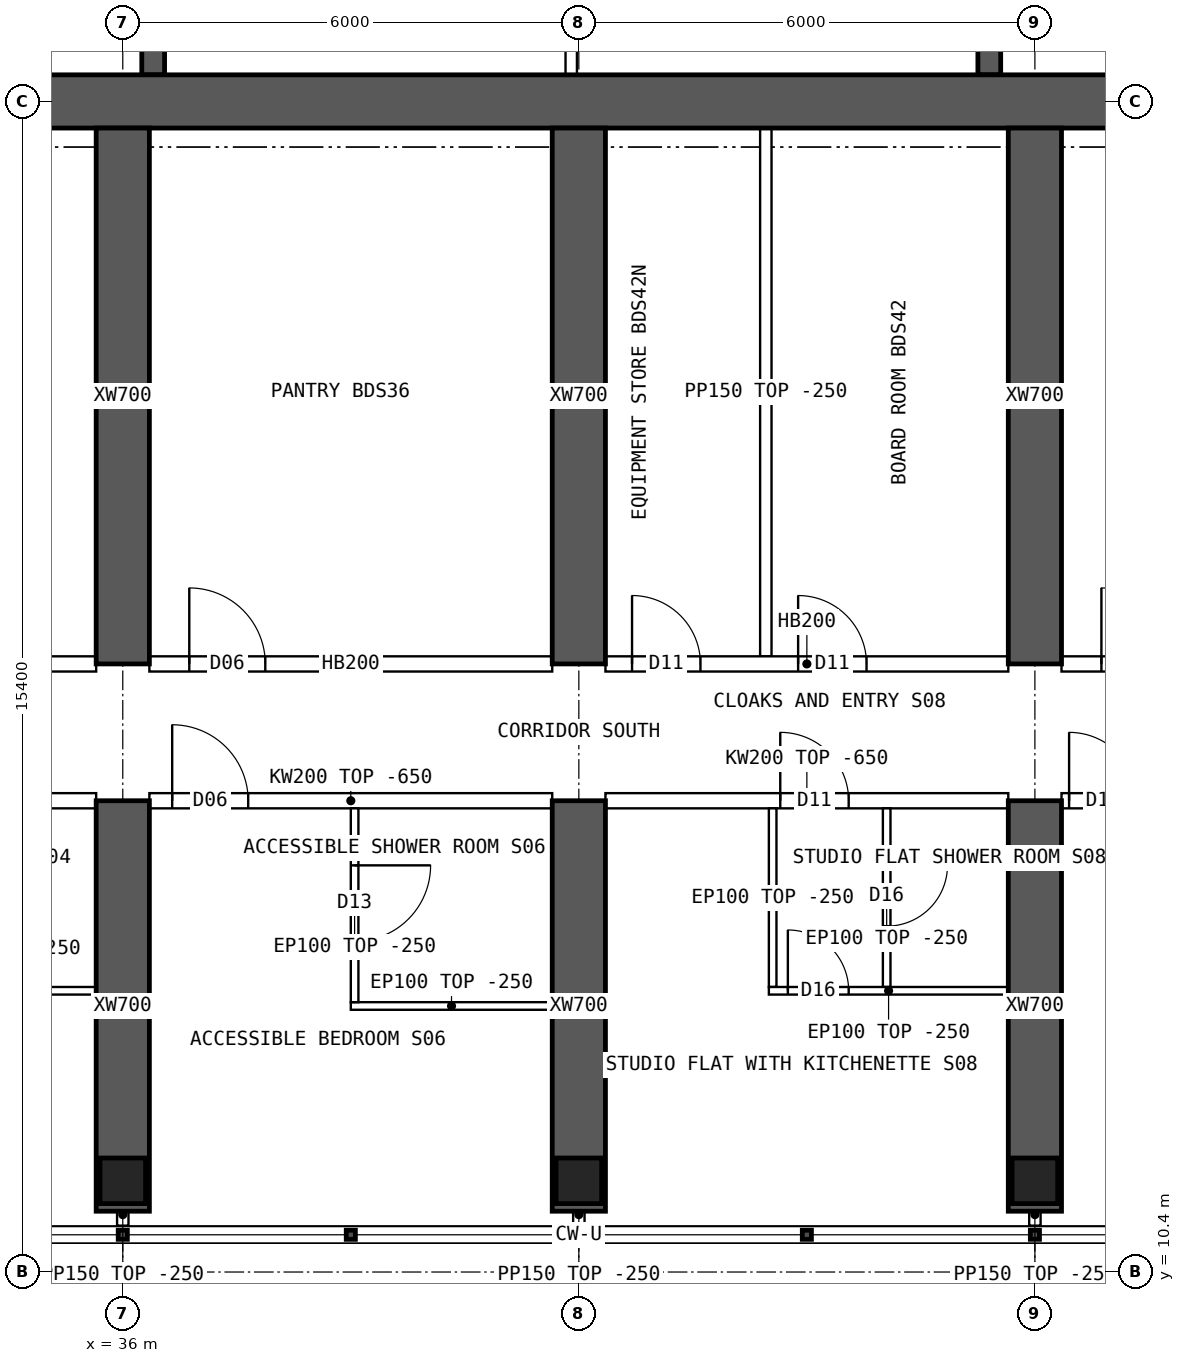
"""IFC4 building model, lengths in metres.
Left out: names, types, materials, properties, quantities, classifications, styles, units other than length and angle.
Written with IfcOpenShell. Run it as: python <this file> out.ifc"""

import sys

from ifc_helpers import new_model, si_unit, direction, frame, frame_2d, origin, origin_2d, place, context, subcontext, project, spatial, polyline, rectangle, hollow_rectangle, outline, extrude, element, fill, save


model = new_model("IFC4")
c1 = context("Model", 3, precision=1e-05, world=origin(), true_north=direction((0.0, 1.0)))
c2 = subcontext(c1, "Body", "Model", "MODEL_VIEW")
j1 = project(units=[si_unit("LENGTHUNIT", "METRE"), si_unit("PLANEANGLEUNIT", "RADIAN")], contexts=[c1])
p1 = place(None, origin())
s1 = spatial("IfcSite", under=j1, at=p1, CompositionType="ELEMENT")
p2 = place(p1, origin())
s2 = spatial("IfcBuilding", under=s1, at=p2, CompositionType="ELEMENT")
p3 = place(p2, frame((0.0, 0.0, 216.55)))
s3 = spatial("IfcBuildingStorey", under=s2, at=p3, CompositionType="ELEMENT", Elevation=216.55)
for number, where, z_axis, x_axis in (
    (1, (36.0, 11.6, 0.0), (0.0, 0.0, 1.0), (1.0, 0.0, 0.0)),
    (2, (42.0, 11.6, 0.0), (0.0, 0.0, 1.0), (1.0, 0.0, 0.0)),
    (3, (48.0, 11.6, 0.0), (0.0, 0.0, 1.0), (1.0, 0.0, 0.0)),
):
    element("IfcColumn", number, at=place(p3, frame(where, z_axis=z_axis, x_axis=x_axis)), inside=s3, PredefinedType="COLUMN", context=c2, shape_type="SweptSolid", body=[
        extrude(hollow_rectangle(XDim=0.6, YDim=0.6, WallThickness=0.06, at=origin_2d()), origin(), (0.0, 0.0, 1.0), 3.75),
    ])
p4 = place(p3, frame((18.0, 25.8, 0.0), z_axis=(0.0, 0.0, 1.0), x_axis=(1.0, 0.0, 0.0)))
e4 = element("IfcWall", 4, at=p4, inside=s3, PredefinedType="SHEAR", context=c2, shape_type="SweptSolid", body=[
    extrude(rectangle(XDim=48.0, YDim=0.7, at=frame_2d((24.0, 0.0))), origin(), (0.0, 0.0, 1.0), 3.75),
])
for number, where, z_axis, x_axis in (
    (5, (36.4, 26.15, 0.0), (0.0, 0.0, 1.0), (0.0, 1.0, 0.0)),
    (6, (47.4, 26.15, 0.0), (0.0, 0.0, 1.0), (0.0, 1.0, 0.0)),
):
    element("IfcWall", number, at=place(p3, frame(where, z_axis=z_axis, x_axis=x_axis)), inside=s3, PredefinedType="SHEAR", context=c2, shape_type="SweptSolid", body=[
        extrude(rectangle(XDim=4.1, YDim=0.3, at=frame_2d((2.05, 0.0))), origin(), (0.0, 0.0, 1.0), 3.75),
    ])
p5 = place(p3, frame((36.0, 11.2, 0.0), z_axis=(0.0, 0.0, 1.0), x_axis=(0.0, 1.0, 0.0)))
e7 = element("IfcWall", 7, at=p5, inside=s3, PredefinedType="SHEAR", context=c2, shape_type="SweptSolid", body=[
    extrude(rectangle(XDim=5.4, YDim=0.7, at=frame_2d((2.7, 0.0))), origin(), (0.0, 0.0, 1.0), 3.75),
])
p6 = place(p3, frame((36.0, 18.4, 0.0), z_axis=(0.0, 0.0, 1.0), x_axis=(0.0, 1.0, 0.0)))
e8 = element("IfcWall", 8, at=p6, inside=s3, PredefinedType="SHEAR", context=c2, shape_type="SweptSolid", body=[
    extrude(rectangle(XDim=7.05, YDim=0.7, at=frame_2d((3.525, 0.0))), origin(), (0.0, 0.0, 1.0), 3.75),
])
p7 = place(p3, frame((42.0, 11.2, 0.0), z_axis=(0.0, 0.0, 1.0), x_axis=(0.0, 1.0, 0.0)))
e9 = element("IfcWall", 9, at=p7, inside=s3, PredefinedType="SHEAR", context=c2, shape_type="SweptSolid", body=[
    extrude(rectangle(XDim=5.4, YDim=0.7, at=frame_2d((2.7, 0.0))), origin(), (0.0, 0.0, 1.0), 3.75),
])
p8 = place(p3, frame((42.0, 18.4, 0.0), z_axis=(0.0, 0.0, 1.0), x_axis=(0.0, 1.0, 0.0)))
e10 = element("IfcWall", 10, at=p8, inside=s3, PredefinedType="SHEAR", context=c2, shape_type="SweptSolid", body=[
    extrude(rectangle(XDim=7.05, YDim=0.7, at=frame_2d((3.525, 0.0))), origin(), (0.0, 0.0, 1.0), 3.75),
])
p9 = place(p3, frame((48.0, 11.2, 0.0), z_axis=(0.0, 0.0, 1.0), x_axis=(0.0, 1.0, 0.0)))
e11 = element("IfcWall", 11, at=p9, inside=s3, PredefinedType="SHEAR", context=c2, shape_type="SweptSolid", body=[
    extrude(rectangle(XDim=5.4, YDim=0.7, at=frame_2d((2.7, 0.0))), origin(), (0.0, 0.0, 1.0), 3.75),
])
p10 = place(p3, frame((48.0, 18.4, 0.0), z_axis=(0.0, 0.0, 1.0), x_axis=(0.0, 1.0, 0.0)))
e12 = element("IfcWall", 12, at=p10, inside=s3, PredefinedType="SHEAR", context=c2, shape_type="SweptSolid", body=[
    extrude(rectangle(XDim=7.05, YDim=0.7, at=frame_2d((3.525, 0.0))), origin(), (0.0, 0.0, 1.0), 3.75),
])
p11 = place(p3, frame((41.9, 26.15, 0.0), z_axis=(0.0, 0.0, 1.0), x_axis=(0.0, 1.0, 0.0)))
e13 = element("IfcWall", 13, at=p11, inside=s3, PredefinedType="SOLIDWALL", context=c2, shape_type="SweptSolid", body=[
    extrude(rectangle(XDim=4.1, YDim=0.15, at=frame_2d((2.05, 0.0))), origin(), (0.0, 0.0, 1.0), 3.5),
])
p12 = place(p3, frame((30.35, 16.6, 0.0), z_axis=(0.0, 0.0, 1.0), x_axis=(1.0, 0.0, 0.0)))
e14 = element("IfcWall", 14, at=p12, inside=s3, PredefinedType="SOLIDWALL", context=c2, shape_type="SweptSolid", body=[
    extrude(outline(polyline([(0.0, 0.0), (5.3, 0.0), (5.3, 3.1), (0.0, 3.1), (0.0, 0.0)])), frame((0.0, 0.1, 0.0), z_axis=(0.0, -1.0, 0.0), x_axis=(1.0, 0.0, 0.0)), (0.0, 0.0, 1.0), 0.2),
])
p13 = place(p12, frame((0.1, 0.0, 0.0)))
e15 = element("IfcOpeningElement", 15, at=p13, cuts=e14, PredefinedType="OPENING", context=c2, shape_type="SweptSolid", body=[
    extrude(rectangle(XDim=0.9, YDim=2.1, at=frame_2d((0.45, 1.05))), frame((0.0, 0.11, 0.0), z_axis=(0.0, -1.0, 0.0), x_axis=(1.0, 0.0, 0.0)), (0.0, 0.0, 1.0), 0.22),
])
p14 = place(p3, frame((30.35, 18.4, 0.0), z_axis=(0.0, 0.0, 1.0), x_axis=(1.0, 0.0, 0.0)))
e16 = element("IfcWall", 16, at=p14, inside=s3, PredefinedType="SOLIDWALL", context=c2, shape_type="SweptSolid", body=[
    extrude(rectangle(XDim=5.3, YDim=0.2, at=frame_2d((2.65, 0.0))), origin(), (0.0, 0.0, 1.0), 3.5),
])
p15 = place(p14, frame((0.8, 0.0, 0.0)))
e17 = element("IfcOpeningElement", 17, at=p15, cuts=e16, PredefinedType="OPENING", context=c2, shape_type="SweptSolid", body=[
    extrude(rectangle(XDim=1.0, YDim=2.1, at=frame_2d((0.5, 1.05))), frame((0.0, 0.11, 0.0), z_axis=(0.0, -1.0, 0.0), x_axis=(1.0, 0.0, 0.0)), (0.0, 0.0, 1.0), 0.22),
])
p16 = place(p3, frame((36.35, 16.6, 0.0), z_axis=(0.0, 0.0, 1.0), x_axis=(1.0, 0.0, 0.0)))
e18 = element("IfcWall", 18, at=p16, inside=s3, PredefinedType="SOLIDWALL", context=c2, shape_type="SweptSolid", body=[
    extrude(outline(polyline([(0.0, 0.0), (5.3, 0.0), (5.3, 3.1), (0.0, 3.1), (0.0, 0.0)])), frame((0.0, 0.1, 0.0), z_axis=(0.0, -1.0, 0.0), x_axis=(1.0, 0.0, 0.0)), (0.0, 0.0, 1.0), 0.2),
])
p17 = place(p16, frame((0.3, 0.0, 0.0)))
e19 = element("IfcOpeningElement", 19, at=p17, cuts=e18, PredefinedType="OPENING", context=c2, shape_type="SweptSolid", body=[
    extrude(rectangle(XDim=1.0, YDim=2.1, at=frame_2d((0.5, 1.05))), frame((0.0, 0.11, 0.0), z_axis=(0.0, -1.0, 0.0), x_axis=(1.0, 0.0, 0.0)), (0.0, 0.0, 1.0), 0.22),
])
p18 = place(p3, frame((36.35, 18.4, 0.0), z_axis=(0.0, 0.0, 1.0), x_axis=(1.0, 0.0, 0.0)))
e20 = element("IfcWall", 20, at=p18, inside=s3, PredefinedType="SOLIDWALL", context=c2, shape_type="SweptSolid", body=[
    extrude(rectangle(XDim=5.3, YDim=0.2, at=frame_2d((2.65, 0.0))), origin(), (0.0, 0.0, 1.0), 3.5),
])
p19 = place(p18, frame((0.525, 0.0, 0.0)))
e21 = element("IfcOpeningElement", 21, at=p19, cuts=e20, PredefinedType="OPENING", context=c2, shape_type="SweptSolid", body=[
    extrude(rectangle(XDim=1.0, YDim=2.1, at=frame_2d((0.5, 1.05))), frame((0.0, 0.11, 0.0), z_axis=(0.0, -1.0, 0.0), x_axis=(1.0, 0.0, 0.0)), (0.0, 0.0, 1.0), 0.22),
])
p20 = place(p3, frame((42.35, 16.6, 0.0), z_axis=(0.0, 0.0, 1.0), x_axis=(1.0, 0.0, 0.0)))
e22 = element("IfcWall", 22, at=p20, inside=s3, PredefinedType="SOLIDWALL", context=c2, shape_type="SweptSolid", body=[
    extrude(outline(polyline([(0.0, 0.0), (5.3, 0.0), (5.3, 3.1), (0.0, 3.1), (0.0, 0.0)])), frame((0.0, 0.1, 0.0), z_axis=(0.0, -1.0, 0.0), x_axis=(1.0, 0.0, 0.0)), (0.0, 0.0, 1.0), 0.2),
])
p21 = place(p20, frame((2.3, 0.0, 0.0)))
e23 = element("IfcOpeningElement", 23, at=p21, cuts=e22, PredefinedType="OPENING", context=c2, shape_type="SweptSolid", body=[
    extrude(rectangle(XDim=0.9, YDim=2.1, at=frame_2d((0.45, 1.05))), frame((0.0, 0.11, 0.0), z_axis=(0.0, -1.0, 0.0), x_axis=(1.0, 0.0, 0.0)), (0.0, 0.0, 1.0), 0.22),
])
p22 = place(p3, frame((42.35, 18.4, 0.0), z_axis=(0.0, 0.0, 1.0), x_axis=(1.0, 0.0, 0.0)))
e24 = element("IfcWall", 24, at=p22, inside=s3, PredefinedType="SOLIDWALL", context=c2, shape_type="SweptSolid", body=[
    extrude(rectangle(XDim=5.3, YDim=0.2, at=frame_2d((2.65, 0.0))), origin(), (0.0, 0.0, 1.0), 3.5),
])
p23 = place(p22, frame((0.35, 0.0, 0.0)))
e25 = element("IfcOpeningElement", 25, at=p23, cuts=e24, PredefinedType="OPENING", context=c2, shape_type="SweptSolid", body=[
    extrude(rectangle(XDim=0.9, YDim=2.1, at=frame_2d((0.45, 1.05))), frame((0.0, 0.11, 0.0), z_axis=(0.0, -1.0, 0.0), x_axis=(1.0, 0.0, 0.0)), (0.0, 0.0, 1.0), 0.22),
])
p24 = place(p22, frame((2.535, 0.0, 0.0)))
e26 = element("IfcOpeningElement", 26, at=p24, cuts=e24, PredefinedType="OPENING", context=c2, shape_type="SweptSolid", body=[
    extrude(rectangle(XDim=0.9, YDim=2.1, at=frame_2d((0.45, 1.05))), frame((0.0, 0.11, 0.0), z_axis=(0.0, -1.0, 0.0), x_axis=(1.0, 0.0, 0.0)), (0.0, 0.0, 1.0), 0.22),
])
p25 = place(p3, frame((48.35, 16.6, 0.0), z_axis=(0.0, 0.0, 1.0), x_axis=(1.0, 0.0, 0.0)))
e27 = element("IfcWall", 27, at=p25, inside=s3, PredefinedType="SOLIDWALL", context=c2, shape_type="SweptSolid", body=[
    extrude(outline(polyline([(0.0, 0.0), (5.3, 0.0), (5.3, 3.1), (0.0, 3.1), (0.0, 0.0)])), frame((0.0, 0.1, 0.0), z_axis=(0.0, -1.0, 0.0), x_axis=(1.0, 0.0, 0.0)), (0.0, 0.0, 1.0), 0.2),
])
p26 = place(p25, frame((0.1, 0.0, 0.0)))
e28 = element("IfcOpeningElement", 28, at=p26, cuts=e27, PredefinedType="OPENING", context=c2, shape_type="SweptSolid", body=[
    extrude(rectangle(XDim=0.9, YDim=2.1, at=frame_2d((0.45, 1.05))), frame((0.0, 0.11, 0.0), z_axis=(0.0, -1.0, 0.0), x_axis=(1.0, 0.0, 0.0)), (0.0, 0.0, 1.0), 0.22),
])
p27 = place(p3, frame((48.35, 18.4, 0.0), z_axis=(0.0, 0.0, 1.0), x_axis=(1.0, 0.0, 0.0)))
e29 = element("IfcWall", 29, at=p27, inside=s3, PredefinedType="SOLIDWALL", context=c2, shape_type="SweptSolid", body=[
    extrude(rectangle(XDim=5.3, YDim=0.2, at=frame_2d((2.65, 0.0))), origin(), (0.0, 0.0, 1.0), 3.5),
])
p28 = place(p27, frame((0.525, 0.0, 0.0)))
e30 = element("IfcOpeningElement", 30, at=p28, cuts=e29, PredefinedType="OPENING", context=c2, shape_type="SweptSolid", body=[
    extrude(rectangle(XDim=1.0, YDim=2.1, at=frame_2d((0.5, 1.05))), frame((0.0, 0.11, 0.0), z_axis=(0.0, -1.0, 0.0), x_axis=(1.0, 0.0, 0.0)), (0.0, 0.0, 1.0), 0.22),
])
p29 = place(p3, frame((35.65, 14.1, 0.0), z_axis=(0.0, 0.0, 1.0), x_axis=(-1.0, 0.0, 0.0)))
e31 = element("IfcWall", 31, at=p29, inside=s3, PredefinedType="PARTITIONING", context=c2, shape_type="SweptSolid", body=[
    extrude(rectangle(XDim=2.55, YDim=0.1, at=frame_2d((1.275, 0.0))), origin(), (0.0, 0.0, 1.0), 3.5),
])
p30 = place(p29, frame((0.825, 0.0, 0.0)))
e32 = element("IfcOpeningElement", 32, at=p30, cuts=e31, PredefinedType="OPENING", context=c2, shape_type="SweptSolid", body=[
    extrude(rectangle(XDim=0.9, YDim=2.1, at=frame_2d((0.45, 1.05))), frame((0.0, 0.06, 0.0), z_axis=(0.0, -1.0, 0.0), x_axis=(1.0, 0.0, 0.0)), (0.0, 0.0, 1.0), 0.12),
])
p31 = place(p3, frame((39.0, 13.9, 0.0), z_axis=(0.0, 0.0, 1.0), x_axis=(1.0, 0.0, 0.0)))
e33 = element("IfcWall", 33, at=p31, inside=s3, PredefinedType="PARTITIONING", context=c2, shape_type="SweptSolid", body=[
    extrude(rectangle(XDim=2.65, YDim=0.1, at=frame_2d((1.325, 0.0))), origin(), (0.0, 0.0, 1.0), 3.5),
])
p32 = place(p3, frame((39.05, 13.95, 0.0), z_axis=(0.0, 0.0, 1.0), x_axis=(0.0, 1.0, 0.0)))
e34 = element("IfcWall", 34, at=p32, inside=s3, PredefinedType="PARTITIONING", context=c2, shape_type="SweptSolid", body=[
    extrude(outline(polyline([(0.0, 0.0), (2.55, 0.0), (2.55, 3.1), (2.502, 3.1), (2.5, 3.5), (0.0, 3.5), (0.0, 0.0)])), frame((0.0, 0.05, 0.0), z_axis=(0.0, -1.0, 0.0), x_axis=(1.0, 0.0, 0.0)), (0.0, 0.0, 1.0), 0.1),
])
p33 = place(p32, frame((0.8, 0.0, 0.0)))
e35 = element("IfcOpeningElement", 35, at=p33, cuts=e34, PredefinedType="OPENING", context=c2, shape_type="SweptSolid", body=[
    extrude(rectangle(XDim=1.0, YDim=2.1, at=frame_2d((0.5, 1.05))), frame((0.0, 0.06, 0.0), z_axis=(0.0, -1.0, 0.0), x_axis=(1.0, 0.0, 0.0)), (0.0, 0.0, 1.0), 0.12),
])
p34 = place(p3, frame((47.65, 14.1, 0.0), z_axis=(0.0, 0.0, 1.0), x_axis=(-1.0, 0.0, 0.0)))
e36 = element("IfcWall", 36, at=p34, inside=s3, PredefinedType="PARTITIONING", context=c2, shape_type="SweptSolid", body=[
    extrude(rectangle(XDim=3.15, YDim=0.1, at=frame_2d((1.575, 0.0))), origin(), (0.0, 0.0, 1.0), 3.5),
])
p35 = place(p34, frame((2.1, 0.0, 0.0)))
e37 = element("IfcOpeningElement", 37, at=p35, cuts=e36, PredefinedType="OPENING", context=c2, shape_type="SweptSolid", body=[
    extrude(rectangle(XDim=0.8, YDim=2.1, at=frame_2d((0.4, 1.05))), frame((0.0, 0.06, 0.0), z_axis=(0.0, -1.0, 0.0), x_axis=(1.0, 0.0, 0.0)), (0.0, 0.0, 1.0), 0.12),
])
p36 = place(p3, frame((44.55, 14.15, 0.0), z_axis=(0.0, 0.0, 1.0), x_axis=(0.0, 1.0, 0.0)))
e38 = element("IfcWall", 38, at=p36, inside=s3, PredefinedType="PARTITIONING", context=c2, shape_type="SweptSolid", body=[
    extrude(outline(polyline([(0.0, 0.0), (2.35, 0.0), (2.35, 3.1), (2.302, 3.1), (2.3, 3.5), (0.0, 3.5), (0.0, 0.0)])), frame((0.0, 0.05, 0.0), z_axis=(0.0, -1.0, 0.0), x_axis=(1.0, 0.0, 0.0)), (0.0, 0.0, 1.0), 0.1),
])
p37 = place(p3, frame((46.05, 14.15, 0.0), z_axis=(0.0, 0.0, 1.0), x_axis=(0.0, 1.0, 0.0)))
e39 = element("IfcWall", 39, at=p37, inside=s3, PredefinedType="PARTITIONING", context=c2, shape_type="SweptSolid", body=[
    extrude(outline(polyline([(0.0, 0.0), (2.35, 0.0), (2.35, 3.1), (2.302, 3.1), (2.3, 3.5), (0.0, 3.5), (0.0, 0.0)])), frame((0.0, 0.05, 0.0), z_axis=(0.0, -1.0, 0.0), x_axis=(1.0, 0.0, 0.0)), (0.0, 0.0, 1.0), 0.1),
])
p38 = place(p37, frame((0.8, 0.0, 0.0)))
e40 = element("IfcOpeningElement", 40, at=p38, cuts=e39, PredefinedType="OPENING", context=c2, shape_type="SweptSolid", body=[
    extrude(rectangle(XDim=0.8, YDim=2.1, at=frame_2d((0.4, 1.05))), frame((0.0, 0.06, 0.0), z_axis=(0.0, -1.0, 0.0), x_axis=(1.0, 0.0, 0.0)), (0.0, 0.0, 1.0), 0.12),
])
p39 = place(p3, frame((44.46, 18.5, 0.0), z_axis=(0.0, 0.0, 1.0), x_axis=(0.0, 1.0, 0.0)))
e41 = element("IfcWall", 41, at=p39, inside=s3, PredefinedType="PARTITIONING", context=c2, shape_type="SweptSolid", body=[
    extrude(rectangle(XDim=6.95, YDim=0.15, at=frame_2d((3.475, 0.0))), origin(), (0.0, 0.0, 1.0), 3.5),
])
for number, where, z_axis, x_axis in (
    (42, (36.0, 11.3, 0.0), (0.0, 0.0, 1.0), (0.0, -1.0, 0.0)),
    (43, (42.0, 11.3, 0.0), (0.0, 0.0, 1.0), (0.0, -1.0, 0.0)),
    (44, (48.0, 11.3, 0.0), (0.0, 0.0, 1.0), (0.0, -1.0, 0.0)),
):
    element("IfcWall", number, at=place(p3, frame(where, z_axis=z_axis, x_axis=x_axis)), inside=s3, PredefinedType="PARTITIONING", context=c2, shape_type="SweptSolid", body=[
        extrude(rectangle(XDim=0.29, YDim=0.15, at=frame_2d((0.145, 0.0))), origin(), (0.0, 0.0, 1.0), 3.5),
    ])
p40 = place(p33, origin())
e45 = element("IfcDoor", 45, at=p40, inside=s3, OperationType="SINGLE_SWING_RIGHT", PredefinedType="DOOR", context=c2, shape_type="SweptSolid", body=[
    extrude(rectangle(XDim=1.0, YDim=2.1, at=frame_2d((0.5, 1.05))), frame((0.0, 0.025, 0.0), z_axis=(0.0, -1.0, 0.0), x_axis=(1.0, 0.0, 0.0)), (0.0, 0.0, 1.0), 0.05),
])
fill(e35, e45)
p41 = place(p17, origin())
e46 = element("IfcDoor", 46, at=p41, inside=s3, OperationType="SINGLE_SWING_LEFT", PredefinedType="DOOR", context=c2, shape_type="SweptSolid", body=[
    extrude(rectangle(XDim=1.0, YDim=2.1, at=frame_2d((0.5, 1.05))), frame((0.0, 0.025, 0.0), z_axis=(0.0, -1.0, 0.0), x_axis=(1.0, 0.0, 0.0)), (0.0, 0.0, 1.0), 0.05),
])
fill(e19, e46)
p42 = place(p35, origin())
e47 = element("IfcDoor", 47, at=p42, inside=s3, OperationType="SINGLE_SWING_RIGHT", PredefinedType="DOOR", context=c2, shape_type="SweptSolid", body=[
    extrude(rectangle(XDim=0.8, YDim=2.1, at=frame_2d((0.4, 1.05))), frame((0.0, 0.025, 0.0), z_axis=(0.0, -1.0, 0.0), x_axis=(1.0, 0.0, 0.0)), (0.0, 0.0, 1.0), 0.05),
])
fill(e37, e47)
p43 = place(p38, origin())
e48 = element("IfcDoor", 48, at=p43, inside=s3, OperationType="SINGLE_SWING_RIGHT", PredefinedType="DOOR", context=c2, shape_type="SweptSolid", body=[
    extrude(rectangle(XDim=0.8, YDim=2.1, at=frame_2d((0.4, 1.05))), frame((0.0, 0.025, 0.0), z_axis=(0.0, -1.0, 0.0), x_axis=(1.0, 0.0, 0.0)), (0.0, 0.0, 1.0), 0.05),
])
fill(e40, e48)
p44 = place(p21, origin())
e49 = element("IfcDoor", 49, at=p44, inside=s3, OperationType="SINGLE_SWING_LEFT", PredefinedType="DOOR", context=c2, shape_type="SweptSolid", body=[
    extrude(rectangle(XDim=0.9, YDim=2.1, at=frame_2d((0.45, 1.05))), frame((0.0, 0.025, 0.0), z_axis=(0.0, -1.0, 0.0), x_axis=(1.0, 0.0, 0.0)), (0.0, 0.0, 1.0), 0.05),
])
fill(e23, e49)
p45 = place(p26, origin())
e50 = element("IfcDoor", 50, at=p45, inside=s3, OperationType="SINGLE_SWING_LEFT", PredefinedType="DOOR", context=c2, shape_type="SweptSolid", body=[
    extrude(rectangle(XDim=0.9, YDim=2.1, at=frame_2d((0.45, 1.05))), frame((0.0, 0.025, 0.0), z_axis=(0.0, -1.0, 0.0), x_axis=(1.0, 0.0, 0.0)), (0.0, 0.0, 1.0), 0.05),
])
fill(e28, e50)
p46 = place(p19, origin())
e51 = element("IfcDoor", 51, at=p46, inside=s3, OperationType="SINGLE_SWING_LEFT", PredefinedType="DOOR", context=c2, shape_type="SweptSolid", body=[
    extrude(rectangle(XDim=1.0, YDim=2.1, at=frame_2d((0.5, 1.05))), frame((0.0, 0.025, 0.0), z_axis=(0.0, -1.0, 0.0), x_axis=(1.0, 0.0, 0.0)), (0.0, 0.0, 1.0), 0.05),
])
fill(e21, e51)
p47 = place(p23, origin())
e52 = element("IfcDoor", 52, at=p47, inside=s3, OperationType="SINGLE_SWING_LEFT", PredefinedType="DOOR", context=c2, shape_type="SweptSolid", body=[
    extrude(rectangle(XDim=0.9, YDim=2.1, at=frame_2d((0.45, 1.05))), frame((0.0, 0.025, 0.0), z_axis=(0.0, -1.0, 0.0), x_axis=(1.0, 0.0, 0.0)), (0.0, 0.0, 1.0), 0.05),
])
fill(e25, e52)
p48 = place(p24, origin())
e53 = element("IfcDoor", 53, at=p48, inside=s3, OperationType="SINGLE_SWING_LEFT", PredefinedType="DOOR", context=c2, shape_type="SweptSolid", body=[
    extrude(rectangle(XDim=0.9, YDim=2.1, at=frame_2d((0.45, 1.05))), frame((0.0, 0.025, 0.0), z_axis=(0.0, -1.0, 0.0), x_axis=(1.0, 0.0, 0.0)), (0.0, 0.0, 1.0), 0.05),
])
fill(e26, e53)
p49 = place(p28, origin())
e54 = element("IfcDoor", 54, at=p49, inside=s3, OperationType="SINGLE_SWING_LEFT", PredefinedType="DOOR", context=c2, shape_type="SweptSolid", body=[
    extrude(rectangle(XDim=1.0, YDim=2.1, at=frame_2d((0.5, 1.05))), frame((0.0, 0.025, 0.0), z_axis=(0.0, -1.0, 0.0), x_axis=(1.0, 0.0, 0.0)), (0.0, 0.0, 1.0), 0.05),
])
fill(e30, e54)
save(model, sys.argv[1])
